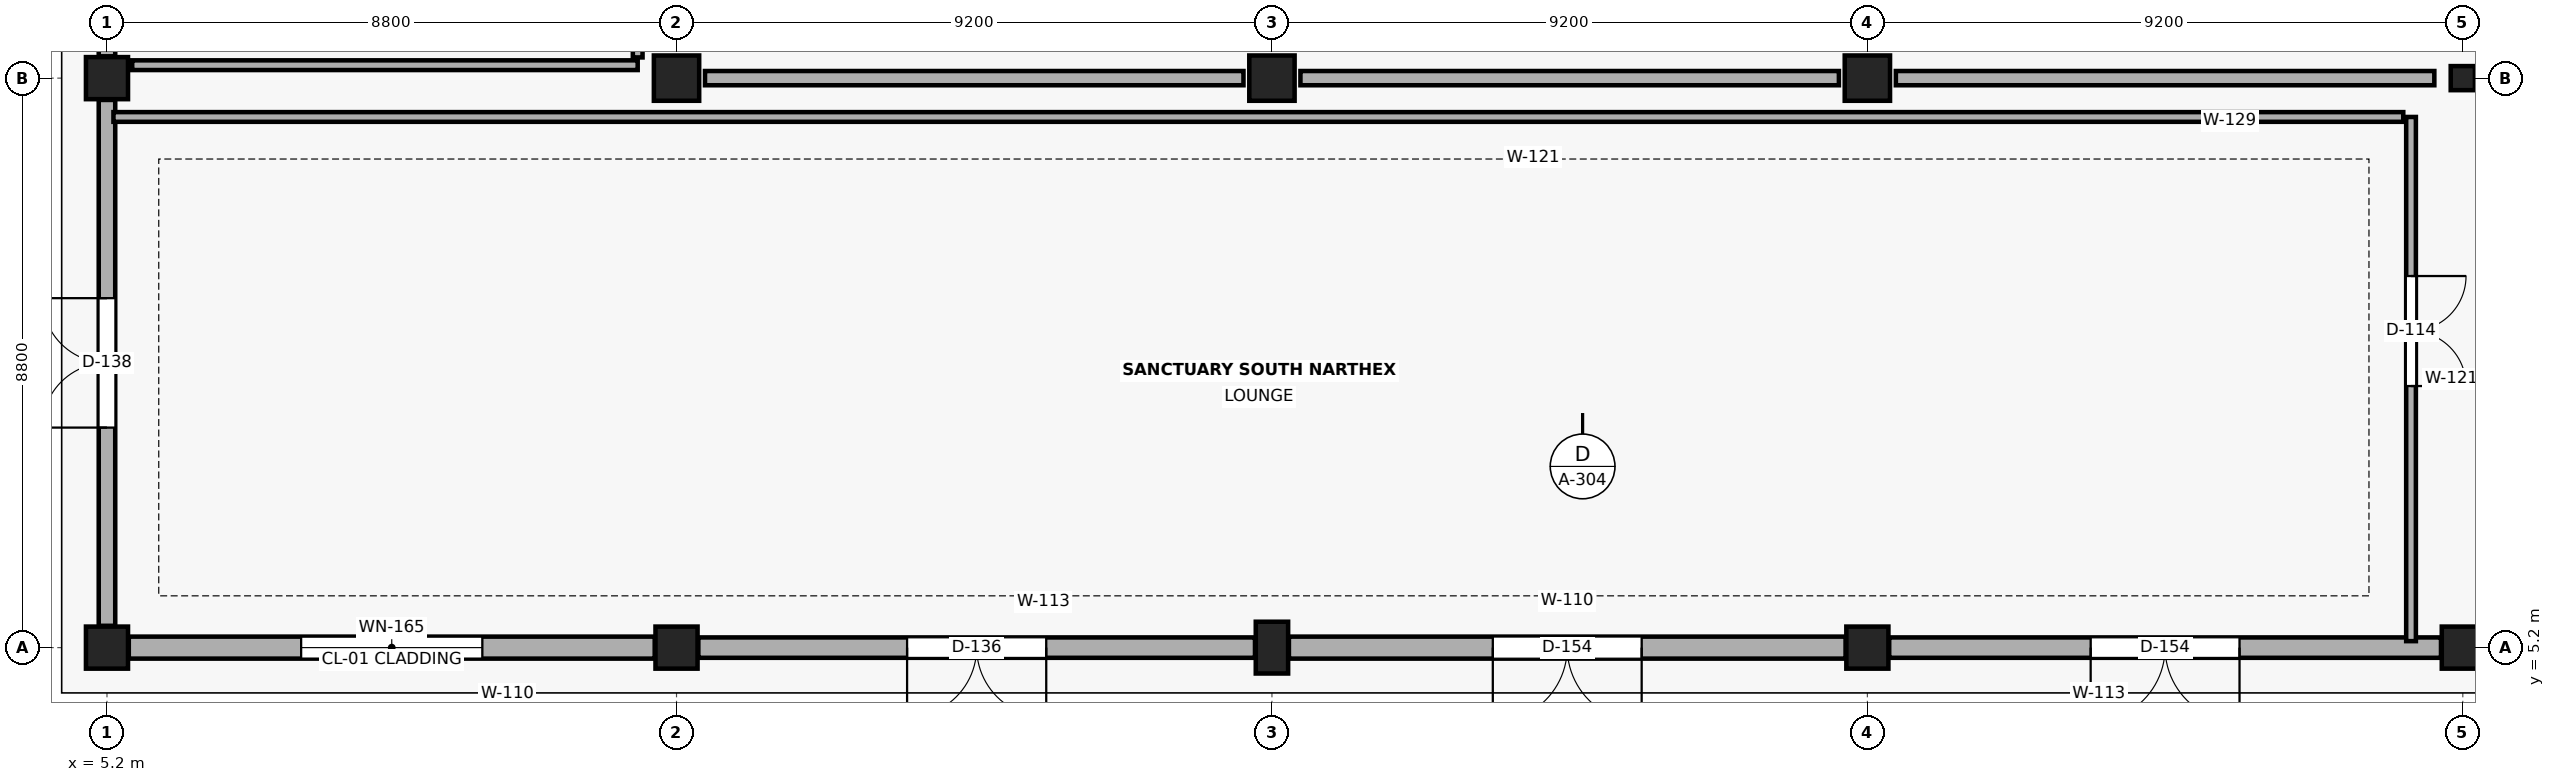
"""IFC4 building model, lengths in metres.
Left out: names, types, materials, properties, quantities, classifications, styles, units other than length and angle.
Written with IfcOpenShell. Run it as: python <this file> out.ifc"""

import sys

from ifc_helpers import new_model, si_unit, direction, frame, frame_2d, origin, origin_2d, place, context, subcontext, project, spatial, rectangle, i_section, extrude, element, fill, save


model = new_model("IFC4")
c1 = context("Model", 3, precision=1e-05, world=origin(), true_north=direction((0.0, 1.0)))
c2 = subcontext(c1, "Body", "Model", "MODEL_VIEW")
j1 = project(units=[si_unit("LENGTHUNIT", "METRE"), si_unit("PLANEANGLEUNIT", "RADIAN")], contexts=[c1])
p1 = place(None, origin())
s1 = spatial("IfcSite", under=j1, at=p1, CompositionType="ELEMENT")
p2 = place(p1, origin())
s2 = spatial("IfcBuilding", under=s1, at=p2, CompositionType="ELEMENT")
p3 = place(p2, origin())
s3 = spatial("IfcBuildingStorey", under=s2, at=p3, CompositionType="ELEMENT", Elevation=0.0)
for number, where, z_axis, x_axis in (
    (1, (5.2, 5.2, 0.0), (0.0, 0.0, 1.0), (1.0, 0.0, 0.0)),
    (2, (5.2, 14.0, 0.0), (0.0, 0.0, 1.0), (1.0, 0.0, 0.0)),
    (3, (14.0, 5.2, 0.0), (0.0, 0.0, 1.0), (1.0, 0.0, 0.0)),
):
    element("IfcColumn", number, at=place(p3, frame(where, z_axis=z_axis, x_axis=x_axis)), inside=s3, PredefinedType="COLUMN", context=c2, shape_type="SweptSolid", body=[
        extrude(rectangle(XDim=0.65, YDim=0.65, at=origin_2d()), origin(), (0.0, 0.0, 1.0), 5.1),
    ])
p4 = place(p3, frame((14.0, 14.0, 0.0), z_axis=(0.0, 0.0, 1.0), x_axis=(1.0, 0.0, 0.0)))
e4 = element("IfcColumn", 4, at=p4, inside=s3, PredefinedType="COLUMN", context=c2, shape_type="SweptSolid", body=[
    extrude(rectangle(XDim=0.7, YDim=0.7, at=origin_2d()), origin(), (0.0, 0.0, 1.0), 5.1),
])
p5 = place(p3, frame((23.2, 5.2, 0.0), z_axis=(0.0, 0.0, 1.0), x_axis=(1.0, 0.0, 0.0)))
e5 = element("IfcColumn", 5, at=p5, inside=s3, PredefinedType="PILASTER", context=c2, shape_type="SweptSolid", body=[
    extrude(rectangle(XDim=0.5, YDim=0.8, at=origin_2d()), origin(), (0.0, 0.0, 1.0), 5.1),
])
p6 = place(p3, frame((23.2, 14.0, 0.0), z_axis=(0.0, 0.0, 1.0), x_axis=(1.0, 0.0, 0.0)))
e6 = element("IfcColumn", 6, at=p6, inside=s3, PredefinedType="COLUMN", context=c2, shape_type="SweptSolid", body=[
    extrude(rectangle(XDim=0.7, YDim=0.7, at=origin_2d()), origin(), (0.0, 0.0, 1.0), 5.1),
])
p7 = place(p3, frame((32.4, 5.2, 0.0), z_axis=(0.0, 0.0, 1.0), x_axis=(1.0, 0.0, 0.0)))
e7 = element("IfcColumn", 7, at=p7, inside=s3, PredefinedType="COLUMN", context=c2, shape_type="SweptSolid", body=[
    extrude(rectangle(XDim=0.65, YDim=0.65, at=origin_2d()), origin(), (0.0, 0.0, 1.0), 5.1),
])
p8 = place(p3, frame((32.4, 14.0, 0.0), z_axis=(0.0, 0.0, 1.0), x_axis=(1.0, 0.0, 0.0)))
e8 = element("IfcColumn", 8, at=p8, inside=s3, PredefinedType="COLUMN", context=c2, shape_type="SweptSolid", body=[
    extrude(rectangle(XDim=0.7, YDim=0.7, at=origin_2d()), origin(), (0.0, 0.0, 1.0), 5.1),
])
p9 = place(p3, frame((41.6, 5.2, 0.0), z_axis=(0.0, 0.0, 1.0), x_axis=(1.0, 0.0, 0.0)))
e9 = element("IfcColumn", 9, at=p9, inside=s3, PredefinedType="COLUMN", context=c2, shape_type="SweptSolid", body=[
    extrude(rectangle(XDim=0.65, YDim=0.65, at=origin_2d()), origin(), (0.0, 0.0, 1.0), 5.1),
])
p10 = place(p3, frame((41.6, 14.0, 0.0), z_axis=(0.0, 0.0, 1.0), x_axis=(1.0, 0.0, 0.0)))
e10 = element("IfcColumn", 10, at=p10, inside=s3, PredefinedType="COLUMN", context=c2, shape_type="SweptSolid", body=[
    extrude(i_section(OverallWidth=0.374, OverallDepth=0.372, WebThickness=0.016, FlangeThickness=0.026, at=origin_2d()), origin(), (0.0, 0.0, 1.0), 5.1),
])
p11 = place(p3, frame((13.663, 5.2, 0.0), z_axis=(0.0, 0.0, 1.0), x_axis=(-1.0, 0.0, 0.0)))
e11 = element("IfcWall", 11, at=p11, inside=s3, PredefinedType="SOLIDWALL", context=c2, shape_type="SweptSolid", body=[
    extrude(rectangle(XDim=8.126, YDim=0.34, at=frame_2d((4.063, 0.0))), origin(), (0.0, 0.0, 1.0), 3.94),
])
p12 = place(p11, frame((2.663, 0.0, 0.85)))
e12 = element("IfcOpeningElement", 12, at=p12, cuts=e11, PredefinedType="OPENING", context=c2, shape_type="SweptSolid", body=[
    extrude(rectangle(XDim=2.8, YDim=2.45, at=frame_2d((1.4, 1.225))), frame((0.0, 0.182, 0.0), z_axis=(0.0, -1.0, 0.0), x_axis=(1.0, 0.0, 0.0)), (0.0, 0.0, 1.0), 0.364),
])
p13 = place(p3, frame((22.938, 5.2, 0.0), z_axis=(0.0, 0.0, 1.0), x_axis=(-1.0, 0.0, 0.0)))
e13 = element("IfcWall", 13, at=p13, inside=s3, PredefinedType="SOLIDWALL", context=c2, shape_type="SweptSolid", body=[
    extrude(rectangle(XDim=8.601, YDim=0.315, at=frame_2d((4.301, 0.0))), origin(), (0.0, 0.0, 1.0), 3.94),
])
p14 = place(p13, frame((3.226, 0.0, 0.0)))
e14 = element("IfcOpeningElement", 14, at=p14, cuts=e13, PredefinedType="OPENING", context=c2, shape_type="SweptSolid", body=[
    extrude(rectangle(XDim=2.15, YDim=2.5, at=frame_2d((1.075, 1.25))), frame((0.0, 0.169, 0.0), z_axis=(0.0, -1.0, 0.0), x_axis=(1.0, 0.0, 0.0)), (0.0, 0.0, 1.0), 0.339),
])
p15 = place(p3, frame((32.063, 5.2, 0.0), z_axis=(0.0, 0.0, 1.0), x_axis=(-1.0, 0.0, 0.0)))
e15 = element("IfcWall", 15, at=p15, inside=s3, PredefinedType="SOLIDWALL", context=c2, shape_type="SweptSolid", body=[
    extrude(rectangle(XDim=8.601, YDim=0.34, at=frame_2d((4.301, 0.0))), origin(), (0.0, 0.0, 1.0), 3.94),
])
p16 = place(p15, frame((3.15, 0.0, 0.0)))
e16 = element("IfcOpeningElement", 16, at=p16, cuts=e15, PredefinedType="OPENING", context=c2, shape_type="SweptSolid", body=[
    extrude(rectangle(XDim=2.3, YDim=2.55, at=frame_2d((1.15, 1.275))), frame((0.0, 0.182, 0.0), z_axis=(0.0, -1.0, 0.0), x_axis=(1.0, 0.0, 0.0)), (0.0, 0.0, 1.0), 0.364),
])
p17 = place(p3, frame((41.263, 5.2, 0.0), z_axis=(0.0, 0.0, 1.0), x_axis=(-1.0, 0.0, 0.0)))
e17 = element("IfcWall", 17, at=p17, inside=s3, PredefinedType="SOLIDWALL", context=c2, shape_type="SweptSolid", body=[
    extrude(rectangle(XDim=8.526, YDim=0.315, at=frame_2d((4.263, 0.0))), origin(), (0.0, 0.0, 1.0), 3.94),
])
p18 = place(p17, frame((3.113, 0.0, 0.0)))
e18 = element("IfcOpeningElement", 18, at=p18, cuts=e17, PredefinedType="OPENING", context=c2, shape_type="SweptSolid", body=[
    extrude(rectangle(XDim=2.3, YDim=2.55, at=frame_2d((1.15, 1.275))), frame((0.0, 0.169, 0.0), z_axis=(0.0, -1.0, 0.0), x_axis=(1.0, 0.0, 0.0)), (0.0, 0.0, 1.0), 0.339),
])
p19 = place(p3, frame((5.2, 5.537, 0.0), z_axis=(0.0, 0.0, 1.0), x_axis=(0.0, 1.0, 0.0)))
e19 = element("IfcWall", 19, at=p19, inside=s3, PredefinedType="SOLIDWALL", context=c2, shape_type="SweptSolid", body=[
    extrude(rectangle(XDim=8.126, YDim=0.255, at=frame_2d((4.063, 0.0))), origin(), (0.0, 0.0, 1.0), 3.94),
])
p20 = place(p19, frame((3.063, 0.0, 0.0)))
e20 = element("IfcOpeningElement", 20, at=p20, cuts=e19, PredefinedType="OPENING", context=c2, shape_type="SweptSolid", body=[
    extrude(rectangle(XDim=2.0, YDim=2.45, at=frame_2d((1.0, 1.225))), frame((0.0, 0.139, 0.0), z_axis=(0.0, -1.0, 0.0), x_axis=(1.0, 0.0, 0.0)), (0.0, 0.0, 1.0), 0.279),
])
p21 = place(p3, frame((5.2, 14.337, 0.0), z_axis=(0.0, 0.0, 1.0), x_axis=(0.0, 1.0, 0.0)))
e21 = element("IfcWall", 21, at=p21, inside=s3, PredefinedType="SOLIDWALL", context=c2, shape_type="SweptSolid", body=[
    extrude(rectangle(XDim=8.526, YDim=0.255, at=frame_2d((4.263, 0.0))), origin(), (0.0, 0.0, 1.0), 3.94),
])
p22 = place(p21, frame((3.113, 0.0, 0.0)))
e22 = element("IfcOpeningElement", 22, at=p22, cuts=e21, PredefinedType="OPENING", context=c2, shape_type="SweptSolid", body=[
    extrude(rectangle(XDim=2.3, YDim=2.55, at=frame_2d((1.15, 1.275))), frame((0.0, 0.139, 0.0), z_axis=(0.0, -1.0, 0.0), x_axis=(1.0, 0.0, 0.0)), (0.0, 0.0, 1.0), 0.279),
])
for number, where, z_axis, x_axis in (
    (23, (14.44, 14.0, 0.0), (0.0, 0.0, 1.0), (1.0, 0.0, 0.0)),
    (24, (23.64, 14.0, 0.0), (0.0, 0.0, 1.0), (1.0, 0.0, 0.0)),
):
    element("IfcWall", number, at=place(p3, frame(where, z_axis=z_axis, x_axis=x_axis)), inside=s3, PredefinedType="PARTITIONING", context=c2, shape_type="SweptSolid", body=[
        extrude(rectangle(XDim=8.32, YDim=0.22, at=frame_2d((4.16, 0.0))), origin(), (0.0, 0.0, 1.0), 4.0),
    ])
p23 = place(p3, frame((32.84, 14.0, 0.0), z_axis=(0.0, 0.0, 1.0), x_axis=(1.0, 0.0, 0.0)))
e25 = element("IfcWall", 25, at=p23, inside=s3, PredefinedType="PARTITIONING", context=c2, shape_type="SweptSolid", body=[
    extrude(rectangle(XDim=8.32, YDim=0.22, at=frame_2d((4.16, 0.0))), origin(), (0.0, 0.0, 1.0), 4.0),
])
p24 = place(p3, frame((40.8, 13.4, 0.0), z_axis=(0.0, 0.0, 1.0), x_axis=(0.0, -1.0, 0.0)))
e26 = element("IfcWall", 26, at=p24, inside=s3, PredefinedType="PARTITIONING", context=c2, shape_type="SweptSolid", body=[
    extrude(rectangle(XDim=8.1, YDim=0.15, at=frame_2d((4.05, 0.0))), origin(), (0.0, 0.0, 1.0), 4.8),
])
p25 = place(p24, frame((2.458, 0.0, 0.0)))
e27 = element("IfcOpeningElement", 27, at=p25, cuts=e26, PredefinedType="OPENING", context=c2, shape_type="SweptSolid", body=[
    extrude(rectangle(XDim=1.7, YDim=2.4, at=frame_2d((0.85, 1.2))), frame((0.0, 0.087, 0.0), z_axis=(0.0, -1.0, 0.0), x_axis=(1.0, 0.0, 0.0)), (0.0, 0.0, 1.0), 0.174),
])
p26 = place(p3, frame((40.68, 13.4, 0.0), z_axis=(0.0, 0.0, 1.0), x_axis=(-1.0, 0.0, 0.0)))
e28 = element("IfcWall", 28, at=p26, inside=s3, PredefinedType="PARTITIONING", context=c2, shape_type="SweptSolid", body=[
    extrude(rectangle(XDim=35.38, YDim=0.15, at=frame_2d((17.69, 0.0))), origin(), (0.0, 0.0, 1.0), 4.8),
])
p27 = place(p3, frame((5.59, 14.2, 0.0), z_axis=(0.0, 0.0, 1.0), x_axis=(1.0, 0.0, 0.0)))
e29 = element("IfcWall", 29, at=p27, inside=s3, PredefinedType="PARTITIONING", context=c2, shape_type="SweptSolid", body=[
    extrude(rectangle(XDim=7.81, YDim=0.15, at=frame_2d((3.905, 0.0))), origin(), (0.0, 0.0, 1.0), 4.0),
])
p28 = place(p3, frame((13.4, 14.32, 0.0), z_axis=(0.0, 0.0, 1.0), x_axis=(0.0, 1.0, 0.0)))
e30 = element("IfcWall", 30, at=p28, inside=s3, PredefinedType="PARTITIONING", context=c2, shape_type="SweptSolid", body=[
    extrude(rectangle(XDim=35.68, YDim=0.15, at=frame_2d((17.84, 0.0))), origin(), (0.0, 0.0, 1.0), 4.8),
])
p29 = place(p12, origin())
e31 = element("IfcWindow", 31, at=p29, inside=s3, PartitioningType="SINGLE_PANEL", PredefinedType="WINDOW", context=c2, shape_type="SweptSolid", body=[
    extrude(rectangle(XDim=2.8, YDim=2.45, at=frame_2d((1.4, 1.225))), frame((0.0, 0.03, 0.0), z_axis=(0.0, -1.0, 0.0), x_axis=(1.0, 0.0, 0.0)), (0.0, 0.0, 1.0), 0.06),
])
fill(e12, e31)
p30 = place(p14, origin())
e32 = element("IfcDoor", 32, at=p30, inside=s3, OperationType="DOUBLE_DOOR_SINGLE_SWING", PredefinedType="DOOR", context=c2, shape_type="SweptSolid", body=[
    extrude(rectangle(XDim=2.15, YDim=2.5, at=frame_2d((1.075, 1.25))), frame((0.0, 0.025, 0.0), z_axis=(0.0, -1.0, 0.0), x_axis=(1.0, 0.0, 0.0)), (0.0, 0.0, 1.0), 0.05),
])
fill(e14, e32)
p31 = place(p16, origin())
e33 = element("IfcDoor", 33, at=p31, inside=s3, OperationType="DOUBLE_DOOR_SINGLE_SWING", PredefinedType="DOOR", context=c2, shape_type="SweptSolid", body=[
    extrude(rectangle(XDim=2.3, YDim=2.55, at=frame_2d((1.15, 1.275))), frame((0.0, 0.025, 0.0), z_axis=(0.0, -1.0, 0.0), x_axis=(1.0, 0.0, 0.0)), (0.0, 0.0, 1.0), 0.05),
])
fill(e16, e33)
p32 = place(p18, origin())
e34 = element("IfcDoor", 34, at=p32, inside=s3, OperationType="DOUBLE_DOOR_SINGLE_SWING", PredefinedType="DOOR", context=c2, shape_type="SweptSolid", body=[
    extrude(rectangle(XDim=2.3, YDim=2.55, at=frame_2d((1.15, 1.275))), frame((0.0, 0.025, 0.0), z_axis=(0.0, -1.0, 0.0), x_axis=(1.0, 0.0, 0.0)), (0.0, 0.0, 1.0), 0.05),
])
fill(e18, e34)
p33 = place(p20, origin())
e35 = element("IfcDoor", 35, at=p33, inside=s3, OperationType="DOUBLE_DOOR_SINGLE_SWING", PredefinedType="DOOR", context=c2, shape_type="SweptSolid", body=[
    extrude(rectangle(XDim=2.0, YDim=2.45, at=frame_2d((1.0, 1.225))), frame((0.0, 0.025, 0.0), z_axis=(0.0, -1.0, 0.0), x_axis=(1.0, 0.0, 0.0)), (0.0, 0.0, 1.0), 0.05),
])
fill(e20, e35)
p34 = place(p25, origin())
e36 = element("IfcDoor", 36, at=p34, inside=s3, OperationType="DOUBLE_DOOR_SINGLE_SWING", PredefinedType="DOOR", context=c2, shape_type="SweptSolid", body=[
    extrude(rectangle(XDim=1.7, YDim=2.4, at=frame_2d((0.85, 1.2))), frame((0.0, 0.025, 0.0), z_axis=(0.0, -1.0, 0.0), x_axis=(1.0, 0.0, 0.0)), (0.0, 0.0, 1.0), 0.05),
])
fill(e27, e36)
save(model, sys.argv[1])
